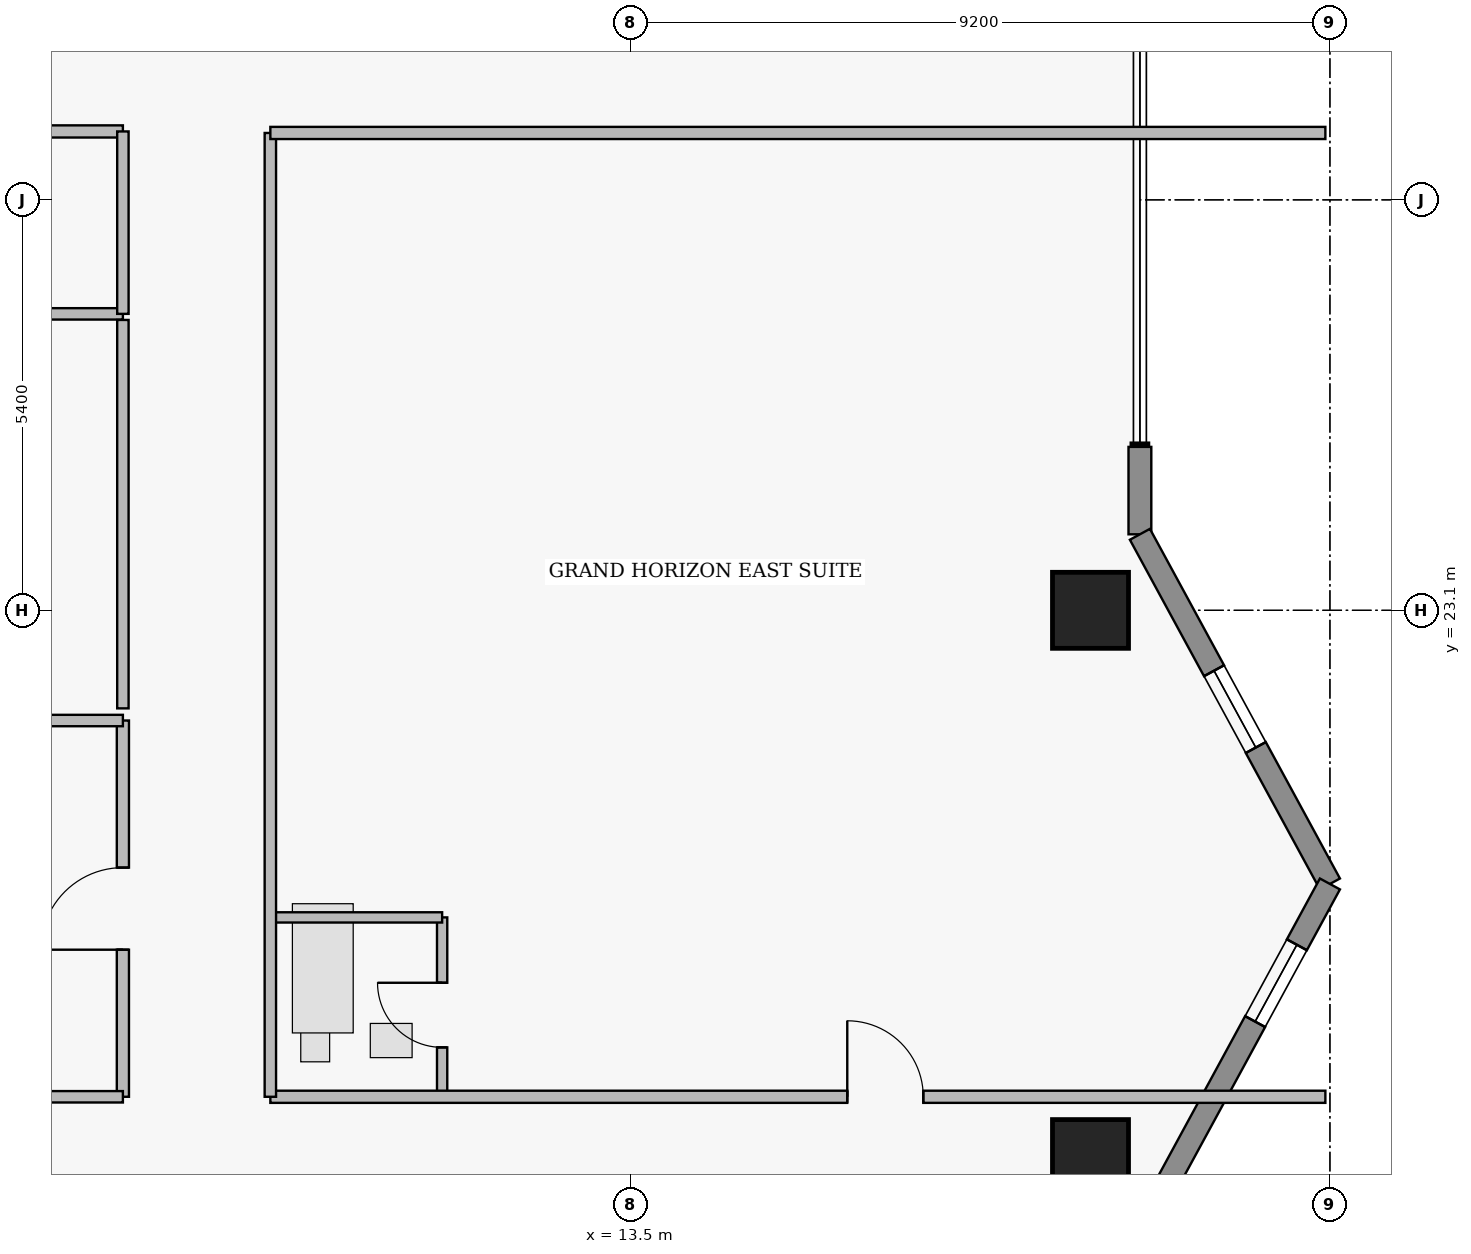
"""IFC4 building model, lengths in metres.
Left out: names, types, materials, properties, quantities, classifications, styles, units other than length and angle.
Written with IfcOpenShell. Run it as: python <this file> out.ifc"""

import sys

from ifc_helpers import new_model, si_unit, direction, frame, frame_2d, origin, origin_2d, place, context, subcontext, project, spatial, rectangle, extrude, element, fill, save


model = new_model("IFC4")
c1 = context("Model", 3, precision=1e-05, world=origin(), true_north=direction((0.0, 1.0)))
c2 = subcontext(c1, "Body", "Model", "MODEL_VIEW")
j1 = project(units=[si_unit("LENGTHUNIT", "METRE"), si_unit("PLANEANGLEUNIT", "RADIAN")], contexts=[c1])
p1 = place(None, origin())
s1 = spatial("IfcSite", under=j1, at=p1, CompositionType="ELEMENT")
p2 = place(p1, origin())
s2 = spatial("IfcBuilding", under=s1, at=p2, CompositionType="ELEMENT")
p3 = place(p2, frame((0.0, 0.0, 261.85)))
s3 = spatial("IfcBuildingStorey", under=s2, at=p3, CompositionType="ELEMENT", Elevation=261.85)
for number, where, z_axis, x_axis in (
    (1, (19.55, 15.9, 0.0), (0.0, 0.0, 1.0), (1.0, 0.0, 0.0)),
    (2, (19.55, 23.1, 0.0), (0.0, 0.0, 1.0), (1.0, 0.0, 0.0)),
):
    element("IfcColumn", number, at=place(p3, frame(where, z_axis=z_axis, x_axis=x_axis)), inside=s3, PredefinedType="COLUMN", context=c2, shape_type="SweptSolid", body=[
        extrude(rectangle(XDim=1.0, YDim=1.0, at=origin_2d()), origin(), (0.0, 0.0, 1.0), 3.7),
    ])
p4 = place(p3, frame((20.2, 25.25, 0.0), z_axis=(0.0, 0.0, 1.0), x_axis=(0.0, -1.0, 0.0)))
e3 = element("IfcWall", 3, at=p4, inside=s3, PredefinedType="STANDARD", context=c2, shape_type="SweptSolid", body=[
    extrude(rectangle(XDim=1.15, YDim=0.3, at=frame_2d((0.575, 0.0))), origin(), (0.0, 0.0, 1.0), 3.48),
])
p5 = place(p3, frame((20.2, 24.1, 0.0), z_axis=(0.0, 0.0, 1.0), x_axis=(0.477505494629, -0.878628762675, 0.0)))
e4 = element("IfcWall", 4, at=p5, inside=s3, PredefinedType="STANDARD", context=c2, shape_type="SweptSolid", body=[
    extrude(rectangle(XDim=5.236, YDim=0.3, at=frame_2d((2.618, 0.0))), origin(), (0.0, 0.0, 1.0), 3.48),
])
p6 = place(p5, frame((2.043, 0.0, 1.25)))
e5 = element("IfcOpeningElement", 5, at=p6, cuts=e4, PredefinedType="OPENING", context=c2, shape_type="SweptSolid", body=[
    extrude(rectangle(XDim=1.15, YDim=1.55, at=frame_2d((0.575, 0.775))), frame((0.0, 0.16, 0.0), z_axis=(0.0, -1.0, 0.0), x_axis=(1.0, 0.0, 0.0)), (0.0, 0.0, 1.0), 0.32),
])
p7 = place(p3, frame((22.7, 19.5, 0.0), z_axis=(0.0, 0.0, 1.0), x_axis=(-0.477505494629, -0.878628762675, 0.0)))
e6 = element("IfcWall", 6, at=p7, inside=s3, PredefinedType="STANDARD", context=c2, shape_type="SweptSolid", body=[
    extrude(rectangle(XDim=5.236, YDim=0.3, at=frame_2d((2.618, 0.0))), origin(), (0.0, 0.0, 1.0), 3.48),
])
p8 = place(p7, frame((0.911, 0.0, 1.25)))
e7 = element("IfcOpeningElement", 7, at=p8, cuts=e6, PredefinedType="OPENING", context=c2, shape_type="SweptSolid", body=[
    extrude(rectangle(XDim=1.15, YDim=1.55, at=frame_2d((0.575, 0.775))), frame((0.0, 0.16, 0.0), z_axis=(0.0, -1.0, 0.0), x_axis=(1.0, 0.0, 0.0)), (0.0, 0.0, 1.0), 0.32),
])
p9 = place(p3, frame((0.08, 29.4, 0.0), z_axis=(0.0, 0.0, 1.0), x_axis=(1.0, 0.0, 0.0)))
e8 = element("IfcWall", 8, at=p9, inside=s3, PredefinedType="PARTITIONING", context=c2, shape_type="SweptSolid", body=[
    extrude(rectangle(XDim=6.74, YDim=0.16, at=frame_2d((3.37, 0.0))), origin(), (0.0, 0.0, 1.0), 3.48),
])
p10 = place(p9, frame((1.71, 0.0, 0.0)))
e9 = element("IfcOpeningElement", 9, at=p10, cuts=e8, PredefinedType="OPENING", context=c2, shape_type="SweptSolid", body=[
    extrude(rectangle(XDim=0.92, YDim=2.12, at=frame_2d((0.46, 1.06))), frame((0.0, 0.09, 0.0), z_axis=(0.0, -1.0, 0.0), x_axis=(1.0, 0.0, 0.0)), (0.0, 0.0, 1.0), 0.18),
])
p11 = place(p3, frame((6.82, 16.7, 0.0), z_axis=(0.0, 0.0, 1.0), x_axis=(0.0, 1.0, 0.0)))
e10 = element("IfcWall", 10, at=p11, inside=s3, PredefinedType="PARTITIONING", context=c2, shape_type="SweptSolid", body=[
    extrude(rectangle(XDim=4.95, YDim=0.16, at=frame_2d((2.475, 0.0))), origin(), (0.0, 0.0, 1.0), 3.48),
])
p12 = place(p11, frame((1.935, 0.0, 0.0)))
e11 = element("IfcOpeningElement", 11, at=p12, cuts=e10, PredefinedType="OPENING", context=c2, shape_type="SweptSolid", body=[
    extrude(rectangle(XDim=1.08, YDim=2.18, at=frame_2d((0.54, 1.09))), frame((0.0, 0.09, 0.0), z_axis=(0.0, -1.0, 0.0), x_axis=(1.0, 0.0, 0.0)), (0.0, 0.0, 1.0), 0.18),
])
p13 = place(p3, frame((11.02, 16.7, 0.0), z_axis=(0.0, 0.0, 1.0), x_axis=(0.0, 1.0, 0.0)))
e12 = element("IfcWall", 12, at=p13, inside=s3, PredefinedType="PLUMBINGWALL", context=c2, shape_type="SweptSolid", body=[
    extrude(rectangle(XDim=2.36, YDim=0.135, at=frame_2d((1.18, 0.0))), origin(), (0.0, 0.0, 1.0), 3.48),
])
p14 = place(p13, frame((0.65, 0.0, 0.0)))
e13 = element("IfcOpeningElement", 13, at=p14, cuts=e12, PredefinedType="OPENING", context=c2, shape_type="SweptSolid", body=[
    extrude(rectangle(XDim=0.85, YDim=2.1, at=frame_2d((0.425, 1.05))), frame((0.0, 0.077, 0.0), z_axis=(0.0, -1.0, 0.0), x_axis=(1.0, 0.0, 0.0)), (0.0, 0.0, 1.0), 0.155),
])
p15 = place(p3, frame((8.76, 16.7, 0.0), z_axis=(0.0, 0.0, 1.0), x_axis=(1.0, 0.0, 0.0)))
e14 = element("IfcWall", 14, at=p15, inside=s3, PredefinedType="PARTITIONING", context=c2, shape_type="SweptSolid", body=[
    extrude(rectangle(XDim=13.88, YDim=0.16, at=frame_2d((6.94, 0.0))), origin(), (0.0, 0.0, 1.0), 3.076),
])
p16 = place(p15, frame((7.59, 0.0, 0.0)))
e15 = element("IfcOpeningElement", 15, at=p16, cuts=e14, PredefinedType="OPENING", context=c2, shape_type="SweptSolid", body=[
    extrude(rectangle(XDim=1.0, YDim=2.15, at=frame_2d((0.5, 1.075))), frame((0.0, 0.09, 0.0), z_axis=(0.0, -1.0, 0.0), x_axis=(1.0, 0.0, 0.0)), (0.0, 0.0, 1.0), 0.18),
])
p17 = place(p3, frame((0.08, 27.0, 0.0), z_axis=(0.0, 0.0, 1.0), x_axis=(1.0, 0.0, 0.0)))
e16 = element("IfcWall", 16, at=p17, inside=s3, PredefinedType="PARTITIONING", context=c2, shape_type="SweptSolid", body=[
    extrude(rectangle(XDim=6.74, YDim=0.15, at=frame_2d((3.37, 0.0))), origin(), (0.0, 0.0, 1.0), 3.48),
])
p18 = place(p3, frame((6.82, 27.0, 0.0), z_axis=(0.0, 0.0, 1.0), x_axis=(0.0, 1.0, 0.0)))
e17 = element("IfcWall", 17, at=p18, inside=s3, PredefinedType="PARTITIONING", context=c2, shape_type="SweptSolid", body=[
    extrude(rectangle(XDim=2.4, YDim=0.15, at=frame_2d((1.2, 0.0))), origin(), (0.0, 0.0, 1.0), 3.48),
])
for number, where, z_axis, x_axis in (
    (18, (0.08, 16.7, 0.0), (0.0, 0.0, 1.0), (1.0, 0.0, 0.0)),
    (19, (0.08, 21.65, 0.0), (0.0, 0.0, 1.0), (1.0, 0.0, 0.0)),
):
    element("IfcWall", number, at=place(p3, frame(where, z_axis=z_axis, x_axis=x_axis)), inside=s3, PredefinedType="PARTITIONING", context=c2, shape_type="SweptSolid", body=[
        extrude(rectangle(XDim=6.74, YDim=0.15, at=frame_2d((3.37, 0.0))), origin(), (0.0, 0.0, 1.0), 3.076),
    ])
p19 = place(p3, frame((6.82, 21.81, 0.0), z_axis=(0.0, 0.0, 1.0), x_axis=(0.0, 1.0, 0.0)))
e20 = element("IfcWall", 20, at=p19, inside=s3, PredefinedType="PARTITIONING", context=c2, shape_type="SweptSolid", body=[
    extrude(rectangle(XDim=5.11, YDim=0.15, at=frame_2d((2.555, 0.0))), origin(), (0.0, 0.0, 1.0), 3.48),
])
p20 = place(p3, frame((8.76, 19.06, 0.0), z_axis=(0.0, 0.0, 1.0), x_axis=(1.0, 0.0, 0.0)))
e21 = element("IfcWall", 21, at=p20, inside=s3, PredefinedType="PLUMBINGWALL", context=c2, shape_type="SweptSolid", body=[
    extrude(rectangle(XDim=2.26, YDim=0.135, at=frame_2d((1.13, 0.0))), origin(), (0.0, 0.0, 1.0), 3.076),
])
p21 = place(p3, frame((8.76, 16.7, 0.0), z_axis=(0.0, 0.0, 1.0), x_axis=(0.0, 1.0, 0.0)))
e22 = element("IfcWall", 22, at=p21, inside=s3, PredefinedType="PARTITIONING", context=c2, shape_type="SweptSolid", body=[
    extrude(rectangle(XDim=12.68, YDim=0.15, at=frame_2d((6.34, 0.0))), origin(), (0.0, 0.0, 1.0), 3.48),
])
p22 = place(p3, frame((8.76, 29.38, 0.0), z_axis=(0.0, 0.0, 1.0), x_axis=(1.0, 0.0, 0.0)))
e23 = element("IfcWall", 23, at=p22, inside=s3, PredefinedType="PARTITIONING", context=c2, shape_type="SweptSolid", body=[
    extrude(rectangle(XDim=13.88, YDim=0.16, at=frame_2d((6.94, 0.0))), origin(), (0.0, 0.0, 1.0), 3.48),
])
p23 = place(p6, origin())
e24 = element("IfcWindow", 24, at=p23, inside=s3, PartitioningType="SINGLE_PANEL", PredefinedType="WINDOW", context=c2, shape_type="SweptSolid", body=[
    extrude(rectangle(XDim=1.15, YDim=1.55, at=frame_2d((0.575, 0.775))), frame((0.0, 0.03, 0.0), z_axis=(0.0, -1.0, 0.0), x_axis=(1.0, 0.0, 0.0)), (0.0, 0.0, 1.0), 0.06),
])
fill(e5, e24)
p24 = place(p8, origin())
e25 = element("IfcWindow", 25, at=p24, inside=s3, PartitioningType="SINGLE_PANEL", PredefinedType="WINDOW", context=c2, shape_type="SweptSolid", body=[
    extrude(rectangle(XDim=1.15, YDim=1.55, at=frame_2d((0.575, 0.775))), frame((0.0, 0.03, 0.0), z_axis=(0.0, -1.0, 0.0), x_axis=(1.0, 0.0, 0.0)), (0.0, 0.0, 1.0), 0.06),
])
fill(e7, e25)
p25 = place(p12, origin())
e26 = element("IfcDoor", 26, at=p25, inside=s3, OperationType="SINGLE_SWING_LEFT", PredefinedType="DOOR", context=c2, shape_type="SweptSolid", body=[
    extrude(rectangle(XDim=1.08, YDim=2.18, at=frame_2d((0.54, 1.09))), frame((0.0, 0.025, 0.0), z_axis=(0.0, -1.0, 0.0), x_axis=(1.0, 0.0, 0.0)), (0.0, 0.0, 1.0), 0.05),
])
fill(e11, e26)
p26 = place(p14, origin())
e27 = element("IfcDoor", 27, at=p26, inside=s3, OperationType="SINGLE_SWING_RIGHT", PredefinedType="DOOR", context=c2, shape_type="SweptSolid", body=[
    extrude(rectangle(XDim=0.85, YDim=2.1, at=frame_2d((0.425, 1.05))), frame((0.0, 0.025, 0.0), z_axis=(0.0, -1.0, 0.0), x_axis=(1.0, 0.0, 0.0)), (0.0, 0.0, 1.0), 0.05),
])
fill(e13, e27)
p27 = place(p16, origin())
e28 = element("IfcDoor", 28, at=p27, inside=s3, OperationType="SINGLE_SWING_LEFT", PredefinedType="DOOR", context=c2, shape_type="SweptSolid", body=[
    extrude(rectangle(XDim=1.0, YDim=2.15, at=frame_2d((0.5, 1.075))), frame((0.0, 0.025, 0.0), z_axis=(0.0, -1.0, 0.0), x_axis=(1.0, 0.0, 0.0)), (0.0, 0.0, 1.0), 0.05),
])
fill(e15, e28)
save(model, sys.argv[1])
